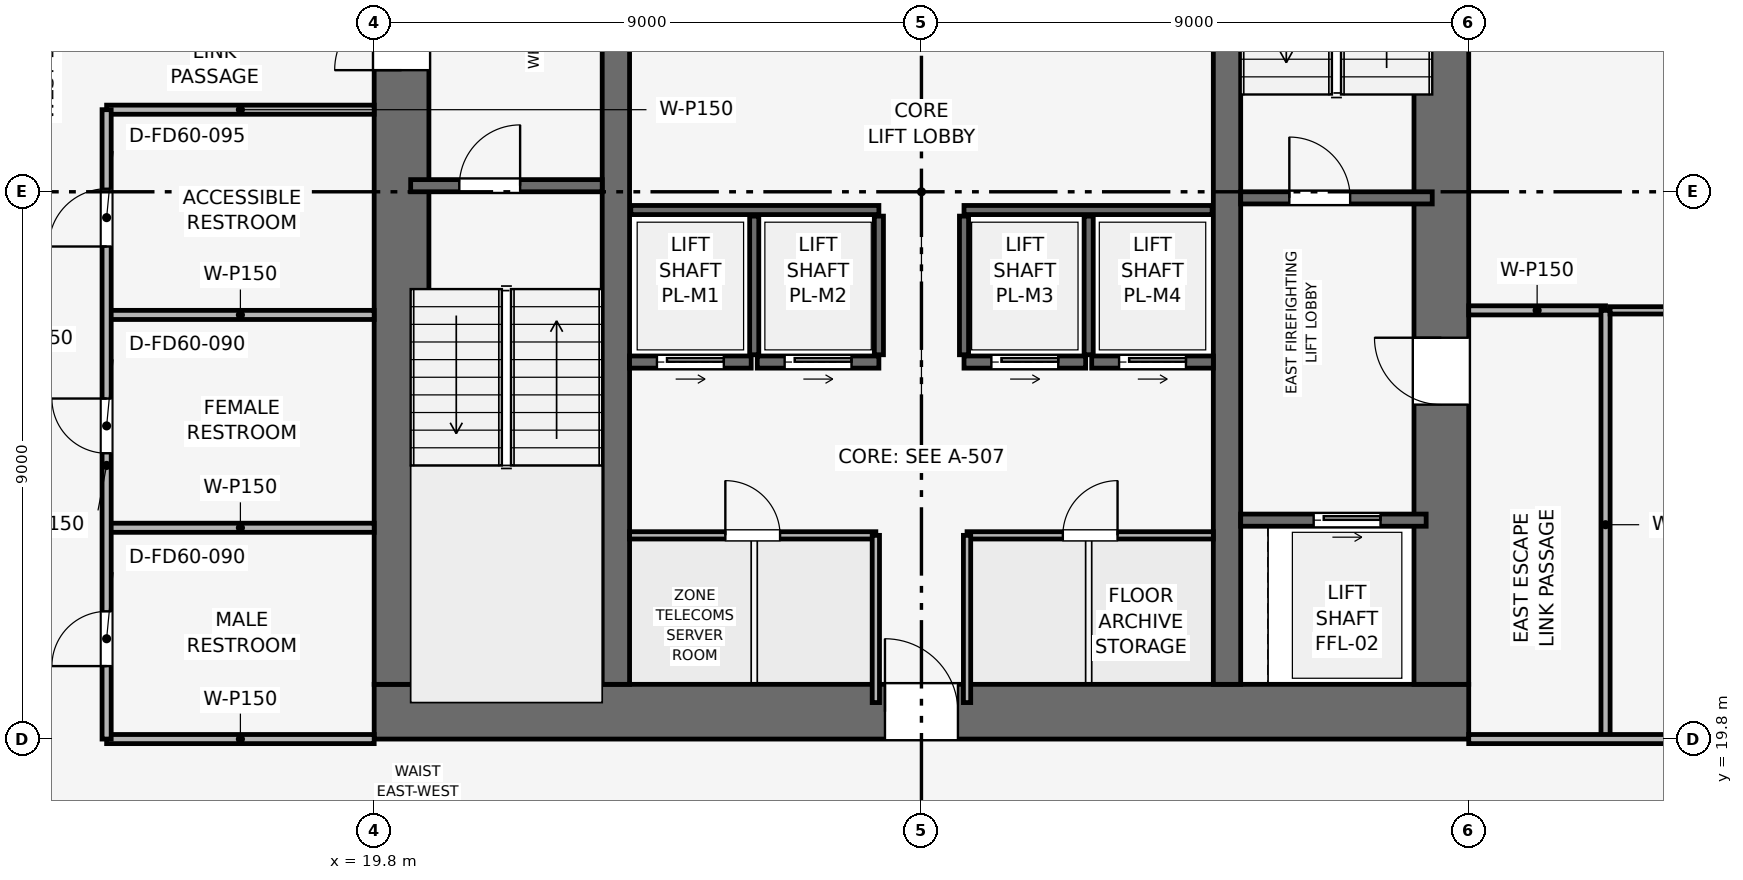
"""IFC4 building model, lengths in metres.
Left out: names, types, materials, properties, quantities, classifications, styles, units other than length and angle.
Written with IfcOpenShell. Run it as: python <this file> out.ifc"""

import sys

from ifc_helpers import new_model, si_unit, direction, frame, frame_2d, origin, place, context, subcontext, project, spatial, rectangle, extrude, element, fill, save


model = new_model("IFC4")
c1 = context("Model", 3, precision=1e-05, world=origin(), true_north=direction((0.0, 1.0)))
c2 = subcontext(c1, "Body", "Model", "MODEL_VIEW")
j1 = project(units=[si_unit("LENGTHUNIT", "METRE"), si_unit("PLANEANGLEUNIT", "RADIAN")], contexts=[c1])
p1 = place(None, origin())
s1 = spatial("IfcSite", under=j1, at=p1, CompositionType="ELEMENT")
p2 = place(p1, origin())
s2 = spatial("IfcBuilding", under=s1, at=p2, CompositionType="ELEMENT")
p3 = place(p2, frame((0.0, 0.0, 157.05)))
s3 = spatial("IfcBuildingStorey", under=s2, at=p3, CompositionType="ELEMENT", Elevation=157.05)
p4 = place(p3, frame((19.8, 20.25, 0.0), z_axis=(0.0, 0.0, 1.0), x_axis=(1.0, 0.0, 0.0)))
e1 = element("IfcWall", 1, at=p4, inside=s3, PredefinedType="SHEAR", context=c2, shape_type="SweptSolid", body=[
    extrude(rectangle(XDim=18.0, YDim=0.9, at=frame_2d((9.0, 0.0))), origin(), (0.0, 0.0, 1.0), 3.75),
])
p5 = place(p4, frame((8.4, 0.0, 0.0)))
e2 = element("IfcOpeningElement", 2, at=p5, cuts=e1, PredefinedType="OPENING", context=c2, shape_type="SweptSolid", body=[
    extrude(rectangle(XDim=1.2, YDim=2.2, at=frame_2d((0.6, 1.1))), frame((0.0, 0.46, 0.0), z_axis=(0.0, -1.0, 0.0), x_axis=(1.0, 0.0, 0.0)), (0.0, 0.0, 1.0), 0.92),
])
p6 = place(p3, frame((20.25, 20.7, 0.0), z_axis=(0.0, 0.0, 1.0), x_axis=(0.0, 1.0, 0.0)))
e3 = element("IfcWall", 3, at=p6, inside=s3, PredefinedType="SHEAR", context=c2, shape_type="SweptSolid", body=[
    extrude(rectangle(XDim=16.2, YDim=0.9, at=frame_2d((8.1, 0.0))), origin(), (0.0, 0.0, 1.0), 3.75),
])
p7 = place(p6, frame((10.1, 0.0, 0.0)))
e4 = element("IfcOpeningElement", 4, at=p7, cuts=e3, PredefinedType="OPENING", context=c2, shape_type="SweptSolid", body=[
    extrude(rectangle(XDim=1.1, YDim=2.15, at=frame_2d((0.55, 1.075))), frame((0.0, 0.46, 0.0), z_axis=(0.0, -1.0, 0.0), x_axis=(1.0, 0.0, 0.0)), (0.0, 0.0, 1.0), 0.92),
])
p8 = place(p3, frame((37.35, 20.7, 0.0), z_axis=(0.0, 0.0, 1.0), x_axis=(0.0, 1.0, 0.0)))
e5 = element("IfcWall", 5, at=p8, inside=s3, PredefinedType="SHEAR", context=c2, shape_type="SweptSolid", body=[
    extrude(rectangle(XDim=16.2, YDim=0.9, at=frame_2d((8.1, 0.0))), origin(), (0.0, 0.0, 1.0), 3.75),
])
p9 = place(p8, frame((4.6, 0.0, 0.0)))
e6 = element("IfcOpeningElement", 6, at=p9, cuts=e5, PredefinedType="OPENING", context=c2, shape_type="SweptSolid", body=[
    extrude(rectangle(XDim=1.1, YDim=2.15, at=frame_2d((0.55, 1.075))), frame((0.0, 0.46, 0.0), z_axis=(0.0, -1.0, 0.0), x_axis=(1.0, 0.0, 0.0)), (0.0, 0.0, 1.0), 0.92),
])
for number, where, z_axis, x_axis in (
    (7, (23.775, 20.7, 0.0), (0.0, 0.0, 1.0), (0.0, 1.0, 0.0)),
    (8, (33.825, 20.7, 0.0), (0.0, 0.0, 1.0), (0.0, 1.0, 0.0)),
):
    element("IfcWall", number, at=place(p3, frame(where, z_axis=z_axis, x_axis=x_axis)), inside=s3, PredefinedType="SHEAR", context=c2, shape_type="SweptSolid", body=[
        extrude(rectangle(XDim=16.2, YDim=0.45, at=frame_2d((8.1, 0.0))), origin(), (0.0, 0.0, 1.0), 3.75),
    ])
p10 = place(p3, frame((20.4, 28.9, 0.0), z_axis=(0.0, 0.0, 1.0), x_axis=(1.0, 0.0, 0.0)))
e9 = element("IfcWall", 9, at=p10, inside=s3, PredefinedType="SHEAR", context=c2, shape_type="SweptSolid", body=[
    extrude(rectangle(XDim=3.15, YDim=0.2, at=frame_2d((1.575, 0.0))), origin(), (0.0, 0.0, 1.0), 3.495),
])
p11 = place(p10, frame((0.8, 0.0, 0.0)))
e10 = element("IfcOpeningElement", 10, at=p11, cuts=e9, PredefinedType="OPENING", context=c2, shape_type="SweptSolid", body=[
    extrude(rectangle(XDim=1.0, YDim=2.1, at=frame_2d((0.5, 1.05))), frame((0.0, 0.11, 0.0), z_axis=(0.0, -1.0, 0.0), x_axis=(1.0, 0.0, 0.0)), (0.0, 0.0, 1.0), 0.22),
])
p12 = place(p3, frame((34.05, 28.7, 0.0), z_axis=(0.0, 0.0, 1.0), x_axis=(1.0, 0.0, 0.0)))
e11 = element("IfcWall", 11, at=p12, inside=s3, PredefinedType="SHEAR", context=c2, shape_type="SweptSolid", body=[
    extrude(rectangle(XDim=3.15, YDim=0.2, at=frame_2d((1.575, 0.0))), origin(), (0.0, 0.0, 1.0), 3.495),
])
p13 = place(p12, frame((0.8, 0.0, 0.0)))
e12 = element("IfcOpeningElement", 12, at=p13, cuts=e11, PredefinedType="OPENING", context=c2, shape_type="SweptSolid", body=[
    extrude(rectangle(XDim=1.0, YDim=2.1, at=frame_2d((0.5, 1.05))), frame((0.0, 0.11, 0.0), z_axis=(0.0, -1.0, 0.0), x_axis=(1.0, 0.0, 0.0)), (0.0, 0.0, 1.0), 0.22),
])
p14 = place(p3, frame((34.05, 23.4, 0.0), z_axis=(0.0, 0.0, 1.0), x_axis=(1.0, 0.0, 0.0)))
e13 = element("IfcWall", 13, at=p14, inside=s3, PredefinedType="SHEAR", context=c2, shape_type="SweptSolid", body=[
    extrude(rectangle(XDim=3.05, YDim=0.2, at=frame_2d((1.525, 0.0))), origin(), (0.0, 0.0, 1.0), 3.495),
])
p15 = place(p14, frame((1.2, 0.0, 0.0)))
e14 = element("IfcOpeningElement", 14, at=p15, cuts=e13, PredefinedType="OPENING", context=c2, shape_type="SweptSolid", body=[
    extrude(rectangle(XDim=1.1, YDim=2.15, at=frame_2d((0.55, 1.075))), frame((0.0, 0.11, 0.0), z_axis=(0.0, -1.0, 0.0), x_axis=(1.0, 0.0, 0.0)), (0.0, 0.0, 1.0), 0.22),
])
p16 = place(p3, frame((24.0, 26.0, 0.0), z_axis=(0.0, 0.0, 1.0), x_axis=(1.0, 0.0, 0.0)))
e15 = element("IfcWall", 15, at=p16, inside=s3, PredefinedType="SHEAR", context=c2, shape_type="SweptSolid", body=[
    extrude(rectangle(XDim=2.0, YDim=0.2, at=frame_2d((1.0, 0.0))), origin(), (0.0, 0.0, 1.0), 3.495),
])
p17 = place(p16, frame((0.45, 0.0, 0.0)))
e16 = element("IfcOpeningElement", 16, at=p17, cuts=e15, PredefinedType="OPENING", context=c2, shape_type="SweptSolid", body=[
    extrude(rectangle(XDim=1.1, YDim=2.15, at=frame_2d((0.55, 1.075))), frame((0.0, 0.11, 0.0), z_axis=(0.0, -1.0, 0.0), x_axis=(1.0, 0.0, 0.0)), (0.0, 0.0, 1.0), 0.22),
])
p18 = place(p3, frame((26.1, 26.0, 0.0), z_axis=(0.0, 0.0, 1.0), x_axis=(1.0, 0.0, 0.0)))
e17 = element("IfcWall", 17, at=p18, inside=s3, PredefinedType="SHEAR", context=c2, shape_type="SweptSolid", body=[
    extrude(rectangle(XDim=2.0, YDim=0.2, at=frame_2d((1.0, 0.0))), origin(), (0.0, 0.0, 1.0), 3.495),
])
p19 = place(p18, frame((0.45, 0.0, 0.0)))
e18 = element("IfcOpeningElement", 18, at=p19, cuts=e17, PredefinedType="OPENING", context=c2, shape_type="SweptSolid", body=[
    extrude(rectangle(XDim=1.1, YDim=2.15, at=frame_2d((0.55, 1.075))), frame((0.0, 0.11, 0.0), z_axis=(0.0, -1.0, 0.0), x_axis=(1.0, 0.0, 0.0)), (0.0, 0.0, 1.0), 0.22),
])
p20 = place(p3, frame((29.5, 26.0, 0.0), z_axis=(0.0, 0.0, 1.0), x_axis=(1.0, 0.0, 0.0)))
e19 = element("IfcWall", 19, at=p20, inside=s3, PredefinedType="SHEAR", context=c2, shape_type="SweptSolid", body=[
    extrude(rectangle(XDim=2.0, YDim=0.2, at=frame_2d((1.0, 0.0))), origin(), (0.0, 0.0, 1.0), 3.495),
])
p21 = place(p20, frame((0.45, 0.0, 0.0)))
e20 = element("IfcOpeningElement", 20, at=p21, cuts=e19, PredefinedType="OPENING", context=c2, shape_type="SweptSolid", body=[
    extrude(rectangle(XDim=1.1, YDim=2.15, at=frame_2d((0.55, 1.075))), frame((0.0, 0.11, 0.0), z_axis=(0.0, -1.0, 0.0), x_axis=(1.0, 0.0, 0.0)), (0.0, 0.0, 1.0), 0.22),
])
p22 = place(p3, frame((31.6, 26.0, 0.0), z_axis=(0.0, 0.0, 1.0), x_axis=(1.0, 0.0, 0.0)))
e21 = element("IfcWall", 21, at=p22, inside=s3, PredefinedType="SHEAR", context=c2, shape_type="SweptSolid", body=[
    extrude(rectangle(XDim=2.0, YDim=0.2, at=frame_2d((1.0, 0.0))), origin(), (0.0, 0.0, 1.0), 3.495),
])
p23 = place(p22, frame((0.45, 0.0, 0.0)))
e22 = element("IfcOpeningElement", 22, at=p23, cuts=e21, PredefinedType="OPENING", context=c2, shape_type="SweptSolid", body=[
    extrude(rectangle(XDim=1.1, YDim=2.15, at=frame_2d((0.55, 1.075))), frame((0.0, 0.11, 0.0), z_axis=(0.0, -1.0, 0.0), x_axis=(1.0, 0.0, 0.0)), (0.0, 0.0, 1.0), 0.22),
])
for number, where, z_axis, x_axis in (
    (23, (24.02, 28.5, 0.0), (0.0, 0.0, 1.0), (1.0, 0.0, 0.0)),
    (24, (29.5, 28.5, 0.0), (0.0, 0.0, 1.0), (1.0, 0.0, 0.0)),
):
    element("IfcWall", number, at=place(p3, frame(where, z_axis=z_axis, x_axis=x_axis)), inside=s3, PredefinedType="SHEAR", context=c2, shape_type="SweptSolid", body=[
        extrude(rectangle(XDim=4.08, YDim=0.15, at=frame_2d((2.04, 0.0))), origin(), (0.0, 0.0, 1.0), 3.495),
    ])
for number, where, z_axis, x_axis in (
    (25, (26.05, 26.12, 0.0), (0.0, 0.0, 1.0), (0.0, 1.0, 0.0)),
    (26, (28.1, 26.12, 0.0), (0.0, 0.0, 1.0), (0.0, 1.0, 0.0)),
    (27, (29.5, 26.12, 0.0), (0.0, 0.0, 1.0), (0.0, 1.0, 0.0)),
    (28, (31.55, 26.12, 0.0), (0.0, 0.0, 1.0), (0.0, 1.0, 0.0)),
):
    element("IfcWall", number, at=place(p3, frame(where, z_axis=z_axis, x_axis=x_axis)), inside=s3, PredefinedType="SHEAR", context=c2, shape_type="SweptSolid", body=[
        extrude(rectangle(XDim=2.28, YDim=0.15, at=frame_2d((1.14, 0.0))), origin(), (0.0, 0.0, 1.0), 3.495),
    ])
p24 = place(p3, frame((24.0, 23.15, 0.0), z_axis=(0.0, 0.0, 1.0), x_axis=(1.0, 0.0, 0.0)))
e29 = element("IfcWall", 29, at=p24, inside=s3, PredefinedType="PARTITIONING", context=c2, shape_type="SweptSolid", body=[
    extrude(rectangle(XDim=4.05, YDim=0.12, at=frame_2d((2.025, 0.0))), origin(), (0.0, 0.0, 1.0), 3.495),
])
p25 = place(p24, frame((1.575, 0.0, 0.0)))
e30 = element("IfcOpeningElement", 30, at=p25, cuts=e29, PredefinedType="OPENING", context=c2, shape_type="SweptSolid", body=[
    extrude(rectangle(XDim=0.9, YDim=2.1, at=frame_2d((0.45, 1.05))), frame((0.0, 0.07, 0.0), z_axis=(0.0, -1.0, 0.0), x_axis=(1.0, 0.0, 0.0)), (0.0, 0.0, 1.0), 0.14),
])
p26 = place(p3, frame((28.05, 20.4, 0.0), z_axis=(0.0, 0.0, 1.0), x_axis=(0.0, 1.0, 0.0)))
e31 = element("IfcWall", 31, at=p26, inside=s3, PredefinedType="PARTITIONING", context=c2, shape_type="SweptSolid", body=[
    extrude(rectangle(XDim=2.75, YDim=0.12, at=frame_2d((1.375, 0.0))), origin(), (0.0, 0.0, 1.0), 3.495),
])
p27 = place(p3, frame((29.55, 23.15, 0.0), z_axis=(0.0, 0.0, 1.0), x_axis=(1.0, 0.0, 0.0)))
e32 = element("IfcWall", 32, at=p27, inside=s3, PredefinedType="PARTITIONING", context=c2, shape_type="SweptSolid", body=[
    extrude(rectangle(XDim=4.05, YDim=0.12, at=frame_2d((2.025, 0.0))), origin(), (0.0, 0.0, 1.0), 3.495),
])
p28 = place(p27, frame((1.575, 0.0, 0.0)))
e33 = element("IfcOpeningElement", 33, at=p28, cuts=e32, PredefinedType="OPENING", context=c2, shape_type="SweptSolid", body=[
    extrude(rectangle(XDim=0.9, YDim=2.1, at=frame_2d((0.45, 1.05))), frame((0.0, 0.07, 0.0), z_axis=(0.0, -1.0, 0.0), x_axis=(1.0, 0.0, 0.0)), (0.0, 0.0, 1.0), 0.14),
])
p29 = place(p3, frame((29.55, 20.4, 0.0), z_axis=(0.0, 0.0, 1.0), x_axis=(0.0, 1.0, 0.0)))
e34 = element("IfcWall", 34, at=p29, inside=s3, PredefinedType="PARTITIONING", context=c2, shape_type="SweptSolid", body=[
    extrude(rectangle(XDim=2.75, YDim=0.12, at=frame_2d((1.375, 0.0))), origin(), (0.0, 0.0, 1.0), 3.495),
])
p30 = place(p3, frame((15.4, 19.8, 0.0), z_axis=(0.0, 0.0, 1.0), x_axis=(1.0, 0.0, 0.0)))
e35 = element("IfcWall", 35, at=p30, inside=s3, PredefinedType="PARTITIONING", context=c2, shape_type="SweptSolid", body=[
    extrude(rectangle(XDim=4.4, YDim=0.15, at=frame_2d((2.2, 0.0))), origin(), (0.0, 0.0, 1.0), 3.03),
])
for number, where, z_axis, x_axis in (
    (36, (15.4, 23.275, 0.0), (0.0, 0.0, 1.0), (1.0, 0.0, 0.0)),
    (37, (15.4, 26.775, 0.0), (0.0, 0.0, 1.0), (1.0, 0.0, 0.0)),
    (38, (15.4, 30.15, 0.0), (0.0, 0.0, 1.0), (1.0, 0.0, 0.0)),
):
    element("IfcWall", number, at=place(p3, frame(where, z_axis=z_axis, x_axis=x_axis)), inside=s3, PredefinedType="PARTITIONING", context=c2, shape_type="SweptSolid", body=[
        extrude(rectangle(XDim=4.4, YDim=0.15, at=frame_2d((2.2, 0.0))), origin(), (0.0, 0.0, 1.0), 3.495),
    ])
p31 = place(p3, frame((15.4, 19.8, 0.0), z_axis=(0.0, 0.0, 1.0), x_axis=(0.0, 1.0, 0.0)))
e39 = element("IfcWall", 39, at=p31, inside=s3, PredefinedType="PARTITIONING", context=c2, shape_type="SweptSolid", body=[
    extrude(rectangle(XDim=10.35, YDim=0.15, at=frame_2d((5.175, 0.0))), origin(), (0.0, 0.0, 1.0), 3.03),
])
p32 = place(p31, frame((1.2, 0.0, 0.0)))
e40 = element("IfcOpeningElement", 40, at=p32, cuts=e39, PredefinedType="OPENING", context=c2, shape_type="SweptSolid", body=[
    extrude(rectangle(XDim=0.9, YDim=2.1, at=frame_2d((0.45, 1.05))), frame((0.0, 0.085, 0.0), z_axis=(0.0, -1.0, 0.0), x_axis=(1.0, 0.0, 0.0)), (0.0, 0.0, 1.0), 0.17),
])
p33 = place(p31, frame((4.7, 0.0, 0.0)))
e41 = element("IfcOpeningElement", 41, at=p33, cuts=e39, PredefinedType="OPENING", context=c2, shape_type="SweptSolid", body=[
    extrude(rectangle(XDim=0.9, YDim=2.1, at=frame_2d((0.45, 1.05))), frame((0.0, 0.085, 0.0), z_axis=(0.0, -1.0, 0.0), x_axis=(1.0, 0.0, 0.0)), (0.0, 0.0, 1.0), 0.17),
])
p34 = place(p31, frame((8.1, 0.0, 0.0)))
e42 = element("IfcOpeningElement", 42, at=p34, cuts=e39, PredefinedType="OPENING", context=c2, shape_type="SweptSolid", body=[
    extrude(rectangle(XDim=0.95, YDim=2.1, at=frame_2d((0.475, 1.05))), frame((0.0, 0.085, 0.0), z_axis=(0.0, -1.0, 0.0), x_axis=(1.0, 0.0, 0.0)), (0.0, 0.0, 1.0), 0.17),
])
p35 = place(p3, frame((37.8, 26.85, 0.0), z_axis=(0.0, 0.0, 1.0), x_axis=(1.0, 0.0, 0.0)))
e43 = element("IfcWall", 43, at=p35, inside=s3, PredefinedType="PARTITIONING", context=c2, shape_type="SweptSolid", body=[
    extrude(rectangle(XDim=2.25, YDim=0.15, at=frame_2d((1.125, 0.0))), origin(), (0.0, 0.0, 1.0), 3.495),
])
p36 = place(p3, frame((40.05, 19.8, 0.0), z_axis=(0.0, 0.0, 1.0), x_axis=(0.0, 1.0, 0.0)))
e44 = element("IfcWall", 44, at=p36, inside=s3, PredefinedType="PARTITIONING", context=c2, shape_type="SweptSolid", body=[
    extrude(rectangle(XDim=7.05, YDim=0.15, at=frame_2d((3.525, 0.0))), origin(), (0.0, 0.0, 1.0), 3.03),
])
p37 = place(p3, frame((40.125, 26.85, 0.0), z_axis=(0.0, 0.0, 1.0), x_axis=(1.0, 0.0, 0.0)))
e45 = element("IfcWall", 45, at=p37, inside=s3, PredefinedType="PARTITIONING", context=c2, shape_type="SweptSolid", body=[
    extrude(rectangle(XDim=12.845, YDim=0.12, at=frame_2d((6.422, 0.0))), origin(), (0.0, 0.0, 1.0), 2.98),
])
p38 = place(p3, frame((37.8, 19.8, 0.0), z_axis=(0.0, 0.0, 1.0), x_axis=(1.0, 0.0, 0.0)))
e46 = element("IfcWall", 46, at=p38, inside=s3, PredefinedType="PARTITIONING", context=c2, shape_type="SweptSolid", body=[
    extrude(rectangle(XDim=15.17, YDim=0.15, at=frame_2d((7.585, 0.0))), origin(), (0.0, 0.0, 1.0), 2.98),
])
p39 = place(p38, frame((4.4, 0.0, 0.0)))
e47 = element("IfcOpeningElement", 47, at=p39, cuts=e46, PredefinedType="OPENING", context=c2, shape_type="SweptSolid", body=[
    extrude(rectangle(XDim=0.9, YDim=2.1, at=frame_2d((0.45, 1.05))), frame((0.0, 0.085, 0.0), z_axis=(0.0, -1.0, 0.0), x_axis=(1.0, 0.0, 0.0)), (0.0, 0.0, 1.0), 0.17),
])
p40 = place(p11, origin())
e48 = element("IfcDoor", 48, at=p40, inside=s3, OperationType="SINGLE_SWING_RIGHT", PredefinedType="DOOR", context=c2, shape_type="SweptSolid", body=[
    extrude(rectangle(XDim=1.0, YDim=2.1, at=frame_2d((0.5, 1.05))), frame((0.0, 0.025, 0.0), z_axis=(0.0, -1.0, 0.0), x_axis=(1.0, 0.0, 0.0)), (0.0, 0.0, 1.0), 0.05),
])
fill(e10, e48)
p41 = place(p13, origin())
e49 = element("IfcDoor", 49, at=p41, inside=s3, OperationType="SINGLE_SWING_LEFT", PredefinedType="DOOR", context=c2, shape_type="SweptSolid", body=[
    extrude(rectangle(XDim=1.0, YDim=2.1, at=frame_2d((0.5, 1.05))), frame((0.0, 0.025, 0.0), z_axis=(0.0, -1.0, 0.0), x_axis=(1.0, 0.0, 0.0)), (0.0, 0.0, 1.0), 0.05),
])
fill(e12, e49)
p42 = place(p15, origin())
e50 = element("IfcDoor", 50, at=p42, inside=s3, OperationType="SLIDING_TO_RIGHT", PredefinedType="DOOR", context=c2, shape_type="SweptSolid", body=[
    extrude(rectangle(XDim=1.1, YDim=2.15, at=frame_2d((0.55, 1.075))), frame((0.0, 0.025, 0.0), z_axis=(0.0, -1.0, 0.0), x_axis=(1.0, 0.0, 0.0)), (0.0, 0.0, 1.0), 0.05),
])
fill(e14, e50)
p43 = place(p17, origin())
e51 = element("IfcDoor", 51, at=p43, inside=s3, OperationType="SLIDING_TO_RIGHT", PredefinedType="DOOR", context=c2, shape_type="SweptSolid", body=[
    extrude(rectangle(XDim=1.1, YDim=2.15, at=frame_2d((0.55, 1.075))), frame((0.0, 0.025, 0.0), z_axis=(0.0, -1.0, 0.0), x_axis=(1.0, 0.0, 0.0)), (0.0, 0.0, 1.0), 0.05),
])
fill(e16, e51)
p44 = place(p19, origin())
e52 = element("IfcDoor", 52, at=p44, inside=s3, OperationType="SLIDING_TO_RIGHT", PredefinedType="DOOR", context=c2, shape_type="SweptSolid", body=[
    extrude(rectangle(XDim=1.1, YDim=2.15, at=frame_2d((0.55, 1.075))), frame((0.0, 0.025, 0.0), z_axis=(0.0, -1.0, 0.0), x_axis=(1.0, 0.0, 0.0)), (0.0, 0.0, 1.0), 0.05),
])
fill(e18, e52)
p45 = place(p21, origin())
e53 = element("IfcDoor", 53, at=p45, inside=s3, OperationType="SLIDING_TO_RIGHT", PredefinedType="DOOR", context=c2, shape_type="SweptSolid", body=[
    extrude(rectangle(XDim=1.1, YDim=2.15, at=frame_2d((0.55, 1.075))), frame((0.0, 0.025, 0.0), z_axis=(0.0, -1.0, 0.0), x_axis=(1.0, 0.0, 0.0)), (0.0, 0.0, 1.0), 0.05),
])
fill(e20, e53)
p46 = place(p23, origin())
e54 = element("IfcDoor", 54, at=p46, inside=s3, OperationType="SLIDING_TO_RIGHT", PredefinedType="DOOR", context=c2, shape_type="SweptSolid", body=[
    extrude(rectangle(XDim=1.1, YDim=2.15, at=frame_2d((0.55, 1.075))), frame((0.0, 0.025, 0.0), z_axis=(0.0, -1.0, 0.0), x_axis=(1.0, 0.0, 0.0)), (0.0, 0.0, 1.0), 0.05),
])
fill(e22, e54)
p47 = place(p25, origin())
e55 = element("IfcDoor", 55, at=p47, inside=s3, OperationType="SINGLE_SWING_LEFT", PredefinedType="DOOR", context=c2, shape_type="SweptSolid", body=[
    extrude(rectangle(XDim=0.9, YDim=2.1, at=frame_2d((0.45, 1.05))), frame((0.0, 0.025, 0.0), z_axis=(0.0, -1.0, 0.0), x_axis=(1.0, 0.0, 0.0)), (0.0, 0.0, 1.0), 0.05),
])
fill(e30, e55)
p48 = place(p28, origin())
e56 = element("IfcDoor", 56, at=p48, inside=s3, OperationType="SINGLE_SWING_RIGHT", PredefinedType="DOOR", context=c2, shape_type="SweptSolid", body=[
    extrude(rectangle(XDim=0.9, YDim=2.1, at=frame_2d((0.45, 1.05))), frame((0.0, 0.025, 0.0), z_axis=(0.0, -1.0, 0.0), x_axis=(1.0, 0.0, 0.0)), (0.0, 0.0, 1.0), 0.05),
])
fill(e33, e56)
p49 = place(p32, origin())
e57 = element("IfcDoor", 57, at=p49, inside=s3, OperationType="SINGLE_SWING_LEFT", PredefinedType="DOOR", context=c2, shape_type="SweptSolid", body=[
    extrude(rectangle(XDim=0.9, YDim=2.1, at=frame_2d((0.45, 1.05))), frame((0.0, 0.025, 0.0), z_axis=(0.0, -1.0, 0.0), x_axis=(1.0, 0.0, 0.0)), (0.0, 0.0, 1.0), 0.05),
])
fill(e40, e57)
p50 = place(p33, origin())
e58 = element("IfcDoor", 58, at=p50, inside=s3, OperationType="SINGLE_SWING_RIGHT", PredefinedType="DOOR", context=c2, shape_type="SweptSolid", body=[
    extrude(rectangle(XDim=0.9, YDim=2.1, at=frame_2d((0.45, 1.05))), frame((0.0, 0.025, 0.0), z_axis=(0.0, -1.0, 0.0), x_axis=(1.0, 0.0, 0.0)), (0.0, 0.0, 1.0), 0.05),
])
fill(e41, e58)
p51 = place(p34, origin())
e59 = element("IfcDoor", 59, at=p51, inside=s3, OperationType="SINGLE_SWING_LEFT", PredefinedType="DOOR", context=c2, shape_type="SweptSolid", body=[
    extrude(rectangle(XDim=0.95, YDim=2.1, at=frame_2d((0.475, 1.05))), frame((0.0, 0.025, 0.0), z_axis=(0.0, -1.0, 0.0), x_axis=(1.0, 0.0, 0.0)), (0.0, 0.0, 1.0), 0.05),
])
fill(e42, e59)
p52 = place(p7, origin())
e60 = element("IfcDoor", 60, at=p52, inside=s3, OperationType="SINGLE_SWING_LEFT", PredefinedType="DOOR", context=c2, shape_type="SweptSolid", body=[
    extrude(rectangle(XDim=1.1, YDim=2.15, at=frame_2d((0.55, 1.075))), frame((0.0, 0.025, 0.0), z_axis=(0.0, -1.0, 0.0), x_axis=(1.0, 0.0, 0.0)), (0.0, 0.0, 1.0), 0.05),
])
fill(e4, e60)
p53 = place(p9, origin())
e61 = element("IfcDoor", 61, at=p53, inside=s3, OperationType="SINGLE_SWING_RIGHT", PredefinedType="DOOR", context=c2, shape_type="SweptSolid", body=[
    extrude(rectangle(XDim=1.1, YDim=2.15, at=frame_2d((0.55, 1.075))), frame((0.0, 0.025, 0.0), z_axis=(0.0, -1.0, 0.0), x_axis=(1.0, 0.0, 0.0)), (0.0, 0.0, 1.0), 0.05),
])
fill(e6, e61)
p54 = place(p5, origin())
e62 = element("IfcDoor", 62, at=p54, inside=s3, OperationType="SINGLE_SWING_LEFT", PredefinedType="DOOR", context=c2, shape_type="SweptSolid", body=[
    extrude(rectangle(XDim=1.2, YDim=2.2, at=frame_2d((0.6, 1.1))), frame((0.0, 0.025, 0.0), z_axis=(0.0, -1.0, 0.0), x_axis=(1.0, 0.0, 0.0)), (0.0, 0.0, 1.0), 0.05),
])
fill(e2, e62)
save(model, sys.argv[1])
